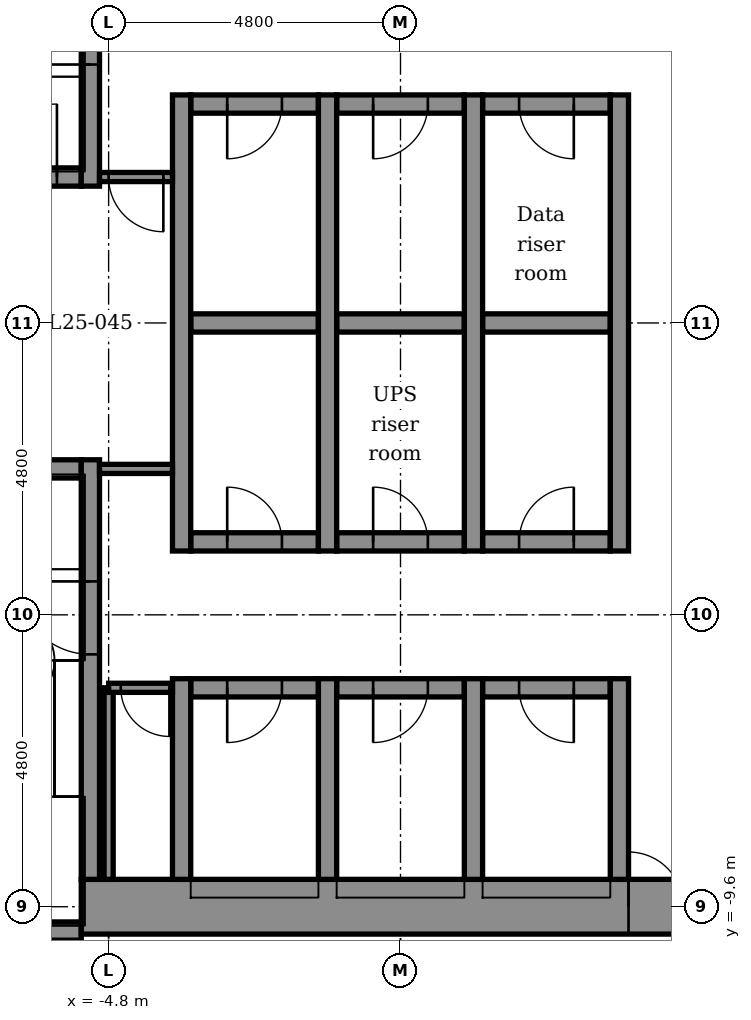
"""IFC4 building model, lengths in metres.
Left out: names, types, materials, properties, quantities, classifications, styles, units other than length and angle.
Written with IfcOpenShell. Run it as: python <this file> out.ifc"""

import sys

from ifc_helpers import new_model, si_unit, direction, frame, frame_2d, origin, place, context, subcontext, project, spatial, rectangle, extrude, element, fill, save


model = new_model("IFC4")
c1 = context("Model", 3, precision=1e-05, world=origin(), true_north=direction((0.0, 1.0)))
c2 = subcontext(c1, "Body", "Model", "MODEL_VIEW")
j1 = project(units=[si_unit("LENGTHUNIT", "METRE"), si_unit("PLANEANGLEUNIT", "RADIAN")], contexts=[c1])
p1 = place(None, origin())
s1 = spatial("IfcSite", under=j1, at=p1, CompositionType="ELEMENT")
p2 = place(p1, origin())
s2 = spatial("IfcBuilding", under=s1, at=p2, CompositionType="ELEMENT")
p3 = place(p2, frame((0.0, 0.0, 127.4)))
s3 = spatial("IfcBuildingStorey", under=s2, at=p3, CompositionType="ELEMENT", Elevation=127.4)
p4 = place(p3, frame((-9.15, -10.0, -0.3), z_axis=(0.0, 0.0, 1.0), x_axis=(1.0, 0.0, 0.0)))
e1 = element("IfcWall", 1, at=p4, inside=s3, PredefinedType="STANDARD", context=c2, shape_type="SweptSolid", body=[
    extrude(rectangle(XDim=3.9, YDim=0.3, at=frame_2d((1.95, 0.0))), origin(), (0.0, 0.0, 1.0), 6.15),
])
p5 = place(p3, frame((-5.25, -9.6, -0.3), z_axis=(0.0, 0.0, 1.0), x_axis=(1.0, 0.0, 0.0)))
e2 = element("IfcWall", 2, at=p5, inside=s3, PredefinedType="SHEAR", context=c2, shape_type="SweptSolid", body=[
    extrude(rectangle(XDim=10.2, YDim=0.9, at=frame_2d((5.1, 0.0))), origin(), (0.0, 0.0, 1.0), 6.15),
])
p6 = place(p5, frame((9.0, 0.0, 0.3)))
e3 = element("IfcOpeningElement", 3, at=p6, cuts=e2, PredefinedType="OPENING", context=c2, shape_type="SweptSolid", body=[
    extrude(rectangle(XDim=0.9, YDim=2.1, at=frame_2d((0.45, 1.05))), frame((0.0, 0.46, 0.0), z_axis=(0.0, -1.0, 0.0), x_axis=(1.0, 0.0, 0.0)), (0.0, 0.0, 1.0), 0.92),
])
p7 = place(p3, frame((-3.45, -6.0, -0.3), z_axis=(0.0, 0.0, 1.0), x_axis=(1.0, 0.0, 0.0)))
e4 = element("IfcWall", 4, at=p7, inside=s3, PredefinedType="STANDARD", context=c2, shape_type="SweptSolid", body=[
    extrude(rectangle(XDim=2.1, YDim=0.3, at=frame_2d((1.05, 0.0))), origin(), (0.0, 0.0, 1.0), 6.15),
])
p8 = place(p7, frame((0.6, 0.0, 0.3)))
e5 = element("IfcOpeningElement", 5, at=p8, cuts=e4, PredefinedType="OPENING", context=c2, shape_type="SweptSolid", body=[
    extrude(rectangle(XDim=0.9, YDim=2.1, at=frame_2d((0.45, 1.05))), frame((0.0, 0.16, 0.0), z_axis=(0.0, -1.0, 0.0), x_axis=(1.0, 0.0, 0.0)), (0.0, 0.0, 1.0), 0.32),
])
p9 = place(p3, frame((-1.05, -6.0, -0.3), z_axis=(0.0, 0.0, 1.0), x_axis=(1.0, 0.0, 0.0)))
e6 = element("IfcWall", 6, at=p9, inside=s3, PredefinedType="STANDARD", context=c2, shape_type="SweptSolid", body=[
    extrude(rectangle(XDim=2.1, YDim=0.3, at=frame_2d((1.05, 0.0))), origin(), (0.0, 0.0, 1.0), 6.15),
])
p10 = place(p9, frame((0.6, 0.0, 0.3)))
e7 = element("IfcOpeningElement", 7, at=p10, cuts=e6, PredefinedType="OPENING", context=c2, shape_type="SweptSolid", body=[
    extrude(rectangle(XDim=0.9, YDim=2.1, at=frame_2d((0.45, 1.05))), frame((0.0, 0.16, 0.0), z_axis=(0.0, -1.0, 0.0), x_axis=(1.0, 0.0, 0.0)), (0.0, 0.0, 1.0), 0.32),
])
p11 = place(p3, frame((1.35, -6.0, -0.3), z_axis=(0.0, 0.0, 1.0), x_axis=(1.0, 0.0, 0.0)))
e8 = element("IfcWall", 8, at=p11, inside=s3, PredefinedType="STANDARD", context=c2, shape_type="SweptSolid", body=[
    extrude(rectangle(XDim=2.1, YDim=0.3, at=frame_2d((1.05, 0.0))), origin(), (0.0, 0.0, 1.0), 6.15),
])
p12 = place(p11, frame((0.6, 0.0, 0.3)))
e9 = element("IfcOpeningElement", 9, at=p12, cuts=e8, PredefinedType="OPENING", context=c2, shape_type="SweptSolid", body=[
    extrude(rectangle(XDim=0.9, YDim=2.1, at=frame_2d((0.45, 1.05))), frame((0.0, 0.16, 0.0), z_axis=(0.0, -1.0, 0.0), x_axis=(1.0, 0.0, 0.0)), (0.0, 0.0, 1.0), 0.32),
])
p13 = place(p3, frame((-3.45, -3.6, -0.3), z_axis=(0.0, 0.0, 1.0), x_axis=(1.0, 0.0, 0.0)))
e10 = element("IfcWall", 10, at=p13, inside=s3, PredefinedType="STANDARD", context=c2, shape_type="SweptSolid", body=[
    extrude(rectangle(XDim=2.1, YDim=0.3, at=frame_2d((1.05, 0.0))), origin(), (0.0, 0.0, 1.0), 6.15),
])
p14 = place(p13, frame((0.6, 0.0, 0.3)))
e11 = element("IfcOpeningElement", 11, at=p14, cuts=e10, PredefinedType="OPENING", context=c2, shape_type="SweptSolid", body=[
    extrude(rectangle(XDim=0.9, YDim=2.1, at=frame_2d((0.45, 1.05))), frame((0.0, 0.16, 0.0), z_axis=(0.0, -1.0, 0.0), x_axis=(1.0, 0.0, 0.0)), (0.0, 0.0, 1.0), 0.32),
])
p15 = place(p3, frame((-1.05, -3.6, -0.3), z_axis=(0.0, 0.0, 1.0), x_axis=(1.0, 0.0, 0.0)))
e12 = element("IfcWall", 12, at=p15, inside=s3, PredefinedType="STANDARD", context=c2, shape_type="SweptSolid", body=[
    extrude(rectangle(XDim=2.1, YDim=0.3, at=frame_2d((1.05, 0.0))), origin(), (0.0, 0.0, 1.0), 6.15),
])
p16 = place(p15, frame((0.6, 0.0, 0.3)))
e13 = element("IfcOpeningElement", 13, at=p16, cuts=e12, PredefinedType="OPENING", context=c2, shape_type="SweptSolid", body=[
    extrude(rectangle(XDim=0.9, YDim=2.1, at=frame_2d((0.45, 1.05))), frame((0.0, 0.16, 0.0), z_axis=(0.0, -1.0, 0.0), x_axis=(1.0, 0.0, 0.0)), (0.0, 0.0, 1.0), 0.32),
])
p17 = place(p3, frame((1.35, -3.6, -0.3), z_axis=(0.0, 0.0, 1.0), x_axis=(1.0, 0.0, 0.0)))
e14 = element("IfcWall", 14, at=p17, inside=s3, PredefinedType="STANDARD", context=c2, shape_type="SweptSolid", body=[
    extrude(rectangle(XDim=2.1, YDim=0.3, at=frame_2d((1.05, 0.0))), origin(), (0.0, 0.0, 1.0), 6.15),
])
p18 = place(p17, frame((0.6, 0.0, 0.3)))
e15 = element("IfcOpeningElement", 15, at=p18, cuts=e14, PredefinedType="OPENING", context=c2, shape_type="SweptSolid", body=[
    extrude(rectangle(XDim=0.9, YDim=2.1, at=frame_2d((0.45, 1.05))), frame((0.0, 0.16, 0.0), z_axis=(0.0, -1.0, 0.0), x_axis=(1.0, 0.0, 0.0)), (0.0, 0.0, 1.0), 0.32),
])
p19 = place(p3, frame((-7.25, -2.4, -0.3), z_axis=(0.0, 0.0, 1.0), x_axis=(1.0, 0.0, 0.0)))
e16 = element("IfcWall", 16, at=p19, inside=s3, PredefinedType="STANDARD", context=c2, shape_type="SweptSolid", body=[
    extrude(rectangle(XDim=2.0, YDim=0.3, at=frame_2d((1.0, 0.0))), origin(), (0.0, 0.0, 1.0), 6.15),
])
p20 = place(p3, frame((-3.45, 0.0, -0.3), z_axis=(0.0, 0.0, 1.0), x_axis=(1.0, 0.0, 0.0)))
e17 = element("IfcWall", 17, at=p20, inside=s3, PredefinedType="STANDARD", context=c2, shape_type="SweptSolid", body=[
    extrude(rectangle(XDim=2.1, YDim=0.3, at=frame_2d((1.05, 0.0))), origin(), (0.0, 0.0, 1.0), 6.15),
])
p21 = place(p3, frame((-1.05, 0.0, -0.3), z_axis=(0.0, 0.0, 1.0), x_axis=(1.0, 0.0, 0.0)))
e18 = element("IfcWall", 18, at=p21, inside=s3, PredefinedType="STANDARD", context=c2, shape_type="SweptSolid", body=[
    extrude(rectangle(XDim=2.1, YDim=0.3, at=frame_2d((1.05, 0.0))), origin(), (0.0, 0.0, 1.0), 6.15),
])
p22 = place(p3, frame((1.35, 0.0, -0.3), z_axis=(0.0, 0.0, 1.0), x_axis=(1.0, 0.0, 0.0)))
e19 = element("IfcWall", 19, at=p22, inside=s3, PredefinedType="STANDARD", context=c2, shape_type="SweptSolid", body=[
    extrude(rectangle(XDim=2.1, YDim=0.3, at=frame_2d((1.05, 0.0))), origin(), (0.0, 0.0, 1.0), 6.15),
])
p23 = place(p3, frame((-7.25, 2.4, -0.3), z_axis=(0.0, 0.0, 1.0), x_axis=(1.0, 0.0, 0.0)))
e20 = element("IfcWall", 20, at=p23, inside=s3, PredefinedType="STANDARD", context=c2, shape_type="SweptSolid", body=[
    extrude(rectangle(XDim=2.0, YDim=0.3, at=frame_2d((1.0, 0.0))), origin(), (0.0, 0.0, 1.0), 6.15),
])
p24 = place(p23, frame((0.4, 0.0, 0.3)))
e21 = element("IfcOpeningElement", 21, at=p24, cuts=e20, PredefinedType="OPENING", context=c2, shape_type="SweptSolid", body=[
    extrude(rectangle(XDim=1.2, YDim=2.1, at=frame_2d((0.6, 1.05))), frame((0.0, 0.16, 0.0), z_axis=(0.0, -1.0, 0.0), x_axis=(1.0, 0.0, 0.0)), (0.0, 0.0, 1.0), 0.32),
])
p25 = place(p3, frame((-3.45, 3.6, -0.3), z_axis=(0.0, 0.0, 1.0), x_axis=(1.0, 0.0, 0.0)))
e22 = element("IfcWall", 22, at=p25, inside=s3, PredefinedType="STANDARD", context=c2, shape_type="SweptSolid", body=[
    extrude(rectangle(XDim=2.1, YDim=0.3, at=frame_2d((1.05, 0.0))), origin(), (0.0, 0.0, 1.0), 6.15),
])
p26 = place(p25, frame((0.6, 0.0, 0.3)))
e23 = element("IfcOpeningElement", 23, at=p26, cuts=e22, PredefinedType="OPENING", context=c2, shape_type="SweptSolid", body=[
    extrude(rectangle(XDim=0.9, YDim=2.1, at=frame_2d((0.45, 1.05))), frame((0.0, 0.16, 0.0), z_axis=(0.0, -1.0, 0.0), x_axis=(1.0, 0.0, 0.0)), (0.0, 0.0, 1.0), 0.32),
])
p27 = place(p3, frame((-1.05, 3.6, -0.3), z_axis=(0.0, 0.0, 1.0), x_axis=(1.0, 0.0, 0.0)))
e24 = element("IfcWall", 24, at=p27, inside=s3, PredefinedType="STANDARD", context=c2, shape_type="SweptSolid", body=[
    extrude(rectangle(XDim=2.1, YDim=0.3, at=frame_2d((1.05, 0.0))), origin(), (0.0, 0.0, 1.0), 6.15),
])
p28 = place(p27, frame((0.6, 0.0, 0.3)))
e25 = element("IfcOpeningElement", 25, at=p28, cuts=e24, PredefinedType="OPENING", context=c2, shape_type="SweptSolid", body=[
    extrude(rectangle(XDim=0.9, YDim=2.1, at=frame_2d((0.45, 1.05))), frame((0.0, 0.16, 0.0), z_axis=(0.0, -1.0, 0.0), x_axis=(1.0, 0.0, 0.0)), (0.0, 0.0, 1.0), 0.32),
])
p29 = place(p3, frame((1.35, 3.6, -0.3), z_axis=(0.0, 0.0, 1.0), x_axis=(1.0, 0.0, 0.0)))
e26 = element("IfcWall", 26, at=p29, inside=s3, PredefinedType="STANDARD", context=c2, shape_type="SweptSolid", body=[
    extrude(rectangle(XDim=2.1, YDim=0.3, at=frame_2d((1.05, 0.0))), origin(), (0.0, 0.0, 1.0), 6.15),
])
p30 = place(p29, frame((0.6, 0.0, 0.3)))
e27 = element("IfcOpeningElement", 27, at=p30, cuts=e26, PredefinedType="OPENING", context=c2, shape_type="SweptSolid", body=[
    extrude(rectangle(XDim=0.9, YDim=2.1, at=frame_2d((0.45, 1.05))), frame((0.0, 0.16, 0.0), z_axis=(0.0, -1.0, 0.0), x_axis=(1.0, 0.0, 0.0)), (0.0, 0.0, 1.0), 0.32),
])
p31 = place(p3, frame((-5.1, -9.15, -0.3), z_axis=(0.0, 0.0, 1.0), x_axis=(0.0, 1.0, 0.0)))
e28 = element("IfcWall", 28, at=p31, inside=s3, PredefinedType="STANDARD", context=c2, shape_type="SweptSolid", body=[
    extrude(rectangle(XDim=6.9, YDim=0.3, at=frame_2d((3.45, 0.0))), origin(), (0.0, 0.0, 1.0), 6.15),
])
p32 = place(p31, frame((3.7, 0.0, 0.3)))
e29 = element("IfcOpeningElement", 29, at=p32, cuts=e28, PredefinedType="OPENING", context=c2, shape_type="SweptSolid", body=[
    extrude(rectangle(XDim=1.2, YDim=2.1, at=frame_2d((0.6, 1.05))), frame((0.0, 0.16, 0.0), z_axis=(0.0, -1.0, 0.0), x_axis=(1.0, 0.0, 0.0)), (0.0, 0.0, 1.0), 0.32),
])
p33 = place(p3, frame((-5.1, 2.25, -0.3), z_axis=(0.0, 0.0, 1.0), x_axis=(0.0, 1.0, 0.0)))
e30 = element("IfcWall", 30, at=p33, inside=s3, PredefinedType="STANDARD", context=c2, shape_type="SweptSolid", body=[
    extrude(rectangle(XDim=6.9, YDim=0.3, at=frame_2d((3.45, 0.0))), origin(), (0.0, 0.0, 1.0), 6.15),
])
p34 = place(p33, frame((2.0, 0.0, 0.3)))
e31 = element("IfcOpeningElement", 31, at=p34, cuts=e30, PredefinedType="OPENING", context=c2, shape_type="SweptSolid", body=[
    extrude(rectangle(XDim=1.2, YDim=2.1, at=frame_2d((0.6, 1.05))), frame((0.0, 0.16, 0.0), z_axis=(0.0, -1.0, 0.0), x_axis=(1.0, 0.0, 0.0)), (0.0, 0.0, 1.0), 0.32),
])
p35 = place(p3, frame((-3.6, -9.15, -0.3), z_axis=(0.0, 0.0, 1.0), x_axis=(0.0, 1.0, 0.0)))
e32 = element("IfcWall", 32, at=p35, inside=s3, PredefinedType="STANDARD", context=c2, shape_type="SweptSolid", body=[
    extrude(rectangle(XDim=3.3, YDim=0.3, at=frame_2d((1.65, 0.0))), origin(), (0.0, 0.0, 1.0), 6.15),
])
p36 = place(p3, frame((-3.6, -3.75, -0.3), z_axis=(0.0, 0.0, 1.0), x_axis=(0.0, 1.0, 0.0)))
e33 = element("IfcWall", 33, at=p36, inside=s3, PredefinedType="STANDARD", context=c2, shape_type="SweptSolid", body=[
    extrude(rectangle(XDim=7.5, YDim=0.3, at=frame_2d((3.75, 0.0))), origin(), (0.0, 0.0, 1.0), 6.15),
])
p37 = place(p3, frame((-1.2, -9.15, -0.3), z_axis=(0.0, 0.0, 1.0), x_axis=(0.0, 1.0, 0.0)))
e34 = element("IfcWall", 34, at=p37, inside=s3, PredefinedType="STANDARD", context=c2, shape_type="SweptSolid", body=[
    extrude(rectangle(XDim=3.3, YDim=0.3, at=frame_2d((1.65, 0.0))), origin(), (0.0, 0.0, 1.0), 6.15),
])
p38 = place(p3, frame((-1.2, -3.75, -0.3), z_axis=(0.0, 0.0, 1.0), x_axis=(0.0, 1.0, 0.0)))
e35 = element("IfcWall", 35, at=p38, inside=s3, PredefinedType="STANDARD", context=c2, shape_type="SweptSolid", body=[
    extrude(rectangle(XDim=7.5, YDim=0.3, at=frame_2d((3.75, 0.0))), origin(), (0.0, 0.0, 1.0), 6.15),
])
p39 = place(p3, frame((1.2, -9.15, -0.3), z_axis=(0.0, 0.0, 1.0), x_axis=(0.0, 1.0, 0.0)))
e36 = element("IfcWall", 36, at=p39, inside=s3, PredefinedType="STANDARD", context=c2, shape_type="SweptSolid", body=[
    extrude(rectangle(XDim=3.3, YDim=0.3, at=frame_2d((1.65, 0.0))), origin(), (0.0, 0.0, 1.0), 6.15),
])
p40 = place(p3, frame((1.2, -3.75, -0.3), z_axis=(0.0, 0.0, 1.0), x_axis=(0.0, 1.0, 0.0)))
e37 = element("IfcWall", 37, at=p40, inside=s3, PredefinedType="STANDARD", context=c2, shape_type="SweptSolid", body=[
    extrude(rectangle(XDim=7.5, YDim=0.3, at=frame_2d((3.75, 0.0))), origin(), (0.0, 0.0, 1.0), 6.15),
])
p41 = place(p3, frame((3.6, -9.15, -0.3), z_axis=(0.0, 0.0, 1.0), x_axis=(0.0, 1.0, 0.0)))
e38 = element("IfcWall", 38, at=p41, inside=s3, PredefinedType="STANDARD", context=c2, shape_type="SweptSolid", body=[
    extrude(rectangle(XDim=3.3, YDim=0.3, at=frame_2d((1.65, 0.0))), origin(), (0.0, 0.0, 1.0), 6.15),
])
p42 = place(p3, frame((3.6, -3.75, -0.3), z_axis=(0.0, 0.0, 1.0), x_axis=(0.0, 1.0, 0.0)))
e39 = element("IfcWall", 39, at=p42, inside=s3, PredefinedType="STANDARD", context=c2, shape_type="SweptSolid", body=[
    extrude(rectangle(XDim=7.5, YDim=0.3, at=frame_2d((3.75, 0.0))), origin(), (0.0, 0.0, 1.0), 6.15),
])
p43 = place(p3, frame((-4.8, -9.15, 0.0), z_axis=(0.0, 0.0, 1.0), x_axis=(0.0, 1.0, 0.0)))
e40 = element("IfcWall", 40, at=p43, inside=s3, PredefinedType="PARTITIONING", context=c2, shape_type="SweptSolid", body=[
    extrude(rectangle(XDim=3.15, YDim=0.15, at=frame_2d((1.575, 0.0))), origin(), (0.0, 0.0, 1.0), 5.85),
])
p44 = place(p3, frame((-4.8, -6.0, 0.0), z_axis=(0.0, 0.0, 1.0), x_axis=(1.0, 0.0, 0.0)))
e41 = element("IfcWall", 41, at=p44, inside=s3, PredefinedType="PARTITIONING", context=c2, shape_type="SweptSolid", body=[
    extrude(rectangle(XDim=1.05, YDim=0.15, at=frame_2d((0.525, 0.0))), origin(), (0.0, 0.0, 1.0), 5.85),
])
p45 = place(p44, frame((0.2, 0.0, 0.0)))
e42 = element("IfcOpeningElement", 42, at=p45, cuts=e41, PredefinedType="OPENING", context=c2, shape_type="SweptSolid", body=[
    extrude(rectangle(XDim=0.8, YDim=2.1, at=frame_2d((0.4, 1.05))), frame((0.0, 0.085, 0.0), z_axis=(0.0, -1.0, 0.0), x_axis=(1.0, 0.0, 0.0)), (0.0, 0.0, 1.0), 0.17),
])
p46 = place(p3, frame((-4.95, 2.4, 0.0), z_axis=(0.0, 0.0, 1.0), x_axis=(1.0, 0.0, 0.0)))
e43 = element("IfcWall", 43, at=p46, inside=s3, PredefinedType="PARTITIONING", context=c2, shape_type="SweptSolid", body=[
    extrude(rectangle(XDim=1.2, YDim=0.15, at=frame_2d((0.6, 0.0))), origin(), (0.0, 0.0, 1.0), 5.85),
])
p47 = place(p46, frame((0.15, 0.0, 0.0)))
e44 = element("IfcOpeningElement", 44, at=p47, cuts=e43, PredefinedType="OPENING", context=c2, shape_type="SweptSolid", body=[
    extrude(rectangle(XDim=0.9, YDim=2.1, at=frame_2d((0.45, 1.05))), frame((0.0, 0.085, 0.0), z_axis=(0.0, -1.0, 0.0), x_axis=(1.0, 0.0, 0.0)), (0.0, 0.0, 1.0), 0.17),
])
p48 = place(p3, frame((-4.95, -2.4, 0.0), z_axis=(0.0, 0.0, 1.0), x_axis=(1.0, 0.0, 0.0)))
e45 = element("IfcWall", 45, at=p48, inside=s3, PredefinedType="PARTITIONING", context=c2, shape_type="SweptSolid", body=[
    extrude(rectangle(XDim=1.2, YDim=0.15, at=frame_2d((0.6, 0.0))), origin(), (0.0, 0.0, 1.0), 5.85),
])
p49 = place(p45, frame((0.8, 0.0, 0.0), z_axis=(0.0, 0.0, 1.0), x_axis=(-1.0, 0.0, 0.0)))
e46 = element("IfcDoor", 46, at=p49, inside=s3, OperationType="SINGLE_SWING_RIGHT", PredefinedType="DOOR", context=c2, shape_type="SweptSolid", body=[
    extrude(rectangle(XDim=0.8, YDim=2.1, at=frame_2d((0.4, 1.05))), frame((0.0, 0.025, 0.0), z_axis=(0.0, -1.0, 0.0), x_axis=(1.0, 0.0, 0.0)), (0.0, 0.0, 1.0), 0.05),
])
fill(e42, e46)
p50 = place(p34, origin())
e47 = element("IfcDoor", 47, at=p50, inside=s3, OperationType="SINGLE_SWING_LEFT", PredefinedType="DOOR", context=c2, shape_type="SweptSolid", body=[
    extrude(rectangle(XDim=1.2, YDim=2.1, at=frame_2d((0.6, 1.05))), frame((0.0, 0.025, 0.0), z_axis=(0.0, -1.0, 0.0), x_axis=(1.0, 0.0, 0.0)), (0.0, 0.0, 1.0), 0.05),
])
fill(e31, e47)
p51 = place(p32, origin())
e48 = element("IfcDoor", 48, at=p51, inside=s3, OperationType="SINGLE_SWING_RIGHT", PredefinedType="DOOR", context=c2, shape_type="SweptSolid", body=[
    extrude(rectangle(XDim=1.2, YDim=2.1, at=frame_2d((0.6, 1.05))), frame((0.0, 0.025, 0.0), z_axis=(0.0, -1.0, 0.0), x_axis=(1.0, 0.0, 0.0)), (0.0, 0.0, 1.0), 0.05),
])
fill(e29, e48)
p52 = place(p26, frame((0.9, 0.0, 0.0), z_axis=(0.0, 0.0, 1.0), x_axis=(-1.0, 0.0, 0.0)))
e49 = element("IfcDoor", 49, at=p52, inside=s3, OperationType="SINGLE_SWING_LEFT", PredefinedType="DOOR", context=c2, shape_type="SweptSolid", body=[
    extrude(rectangle(XDim=0.9, YDim=2.1, at=frame_2d((0.45, 1.05))), frame((0.0, 0.025, 0.0), z_axis=(0.0, -1.0, 0.0), x_axis=(1.0, 0.0, 0.0)), (0.0, 0.0, 1.0), 0.05),
])
fill(e23, e49)
p53 = place(p28, frame((0.9, 0.0, 0.0), z_axis=(0.0, 0.0, 1.0), x_axis=(-1.0, 0.0, 0.0)))
e50 = element("IfcDoor", 50, at=p53, inside=s3, OperationType="SINGLE_SWING_LEFT", PredefinedType="DOOR", context=c2, shape_type="SweptSolid", body=[
    extrude(rectangle(XDim=0.9, YDim=2.1, at=frame_2d((0.45, 1.05))), frame((0.0, 0.025, 0.0), z_axis=(0.0, -1.0, 0.0), x_axis=(1.0, 0.0, 0.0)), (0.0, 0.0, 1.0), 0.05),
])
fill(e25, e50)
p54 = place(p30, frame((0.9, 0.0, 0.0), z_axis=(0.0, 0.0, 1.0), x_axis=(-1.0, 0.0, 0.0)))
e51 = element("IfcDoor", 51, at=p54, inside=s3, OperationType="SINGLE_SWING_RIGHT", PredefinedType="DOOR", context=c2, shape_type="SweptSolid", body=[
    extrude(rectangle(XDim=0.9, YDim=2.1, at=frame_2d((0.45, 1.05))), frame((0.0, 0.025, 0.0), z_axis=(0.0, -1.0, 0.0), x_axis=(1.0, 0.0, 0.0)), (0.0, 0.0, 1.0), 0.05),
])
fill(e27, e51)
p55 = place(p14, origin())
e52 = element("IfcDoor", 52, at=p55, inside=s3, OperationType="SINGLE_SWING_LEFT", PredefinedType="DOOR", context=c2, shape_type="SweptSolid", body=[
    extrude(rectangle(XDim=0.9, YDim=2.1, at=frame_2d((0.45, 1.05))), frame((0.0, 0.025, 0.0), z_axis=(0.0, -1.0, 0.0), x_axis=(1.0, 0.0, 0.0)), (0.0, 0.0, 1.0), 0.05),
])
fill(e11, e52)
p56 = place(p16, origin())
e53 = element("IfcDoor", 53, at=p56, inside=s3, OperationType="SINGLE_SWING_LEFT", PredefinedType="DOOR", context=c2, shape_type="SweptSolid", body=[
    extrude(rectangle(XDim=0.9, YDim=2.1, at=frame_2d((0.45, 1.05))), frame((0.0, 0.025, 0.0), z_axis=(0.0, -1.0, 0.0), x_axis=(1.0, 0.0, 0.0)), (0.0, 0.0, 1.0), 0.05),
])
fill(e13, e53)
p57 = place(p18, origin())
e54 = element("IfcDoor", 54, at=p57, inside=s3, OperationType="SINGLE_SWING_RIGHT", PredefinedType="DOOR", context=c2, shape_type="SweptSolid", body=[
    extrude(rectangle(XDim=0.9, YDim=2.1, at=frame_2d((0.45, 1.05))), frame((0.0, 0.025, 0.0), z_axis=(0.0, -1.0, 0.0), x_axis=(1.0, 0.0, 0.0)), (0.0, 0.0, 1.0), 0.05),
])
fill(e15, e54)
p58 = place(p8, frame((0.9, 0.0, 0.0), z_axis=(0.0, 0.0, 1.0), x_axis=(-1.0, 0.0, 0.0)))
e55 = element("IfcDoor", 55, at=p58, inside=s3, OperationType="SINGLE_SWING_LEFT", PredefinedType="DOOR", context=c2, shape_type="SweptSolid", body=[
    extrude(rectangle(XDim=0.9, YDim=2.1, at=frame_2d((0.45, 1.05))), frame((0.0, 0.025, 0.0), z_axis=(0.0, -1.0, 0.0), x_axis=(1.0, 0.0, 0.0)), (0.0, 0.0, 1.0), 0.05),
])
fill(e5, e55)
p59 = place(p10, frame((0.9, 0.0, 0.0), z_axis=(0.0, 0.0, 1.0), x_axis=(-1.0, 0.0, 0.0)))
e56 = element("IfcDoor", 56, at=p59, inside=s3, OperationType="SINGLE_SWING_LEFT", PredefinedType="DOOR", context=c2, shape_type="SweptSolid", body=[
    extrude(rectangle(XDim=0.9, YDim=2.1, at=frame_2d((0.45, 1.05))), frame((0.0, 0.025, 0.0), z_axis=(0.0, -1.0, 0.0), x_axis=(1.0, 0.0, 0.0)), (0.0, 0.0, 1.0), 0.05),
])
fill(e7, e56)
p60 = place(p12, frame((0.9, 0.0, 0.0), z_axis=(0.0, 0.0, 1.0), x_axis=(-1.0, 0.0, 0.0)))
e57 = element("IfcDoor", 57, at=p60, inside=s3, OperationType="SINGLE_SWING_RIGHT", PredefinedType="DOOR", context=c2, shape_type="SweptSolid", body=[
    extrude(rectangle(XDim=0.9, YDim=2.1, at=frame_2d((0.45, 1.05))), frame((0.0, 0.025, 0.0), z_axis=(0.0, -1.0, 0.0), x_axis=(1.0, 0.0, 0.0)), (0.0, 0.0, 1.0), 0.05),
])
fill(e9, e57)
p61 = place(p6, origin())
e58 = element("IfcDoor", 58, at=p61, inside=s3, OperationType="SINGLE_SWING_LEFT", PredefinedType="DOOR", context=c2, shape_type="SweptSolid", body=[
    extrude(rectangle(XDim=0.9, YDim=2.1, at=frame_2d((0.45, 1.05))), frame((0.0, 0.025, 0.0), z_axis=(0.0, -1.0, 0.0), x_axis=(1.0, 0.0, 0.0)), (0.0, 0.0, 1.0), 0.05),
])
fill(e3, e58)
p62 = place(p47, frame((0.9, 0.0, 0.0), z_axis=(0.0, 0.0, 1.0), x_axis=(-1.0, 0.0, 0.0)))
e59 = element("IfcDoor", 59, at=p62, inside=s3, OperationType="SINGLE_SWING_RIGHT", PredefinedType="DOOR", context=c2, shape_type="SweptSolid", body=[
    extrude(rectangle(XDim=0.9, YDim=2.1, at=frame_2d((0.45, 1.05))), frame((0.0, 0.025, 0.0), z_axis=(0.0, -1.0, 0.0), x_axis=(1.0, 0.0, 0.0)), (0.0, 0.0, 1.0), 0.05),
])
fill(e44, e59)
p63 = place(p24, origin())
e60 = element("IfcDoor", 60, at=p63, inside=s3, OperationType="SINGLE_SWING_RIGHT", PredefinedType="DOOR", context=c2, shape_type="SweptSolid", body=[
    extrude(rectangle(XDim=1.2, YDim=2.1, at=frame_2d((0.6, 1.05))), frame((0.0, 0.025, 0.0), z_axis=(0.0, -1.0, 0.0), x_axis=(1.0, 0.0, 0.0)), (0.0, 0.0, 1.0), 0.05),
])
fill(e21, e60)
save(model, sys.argv[1])
